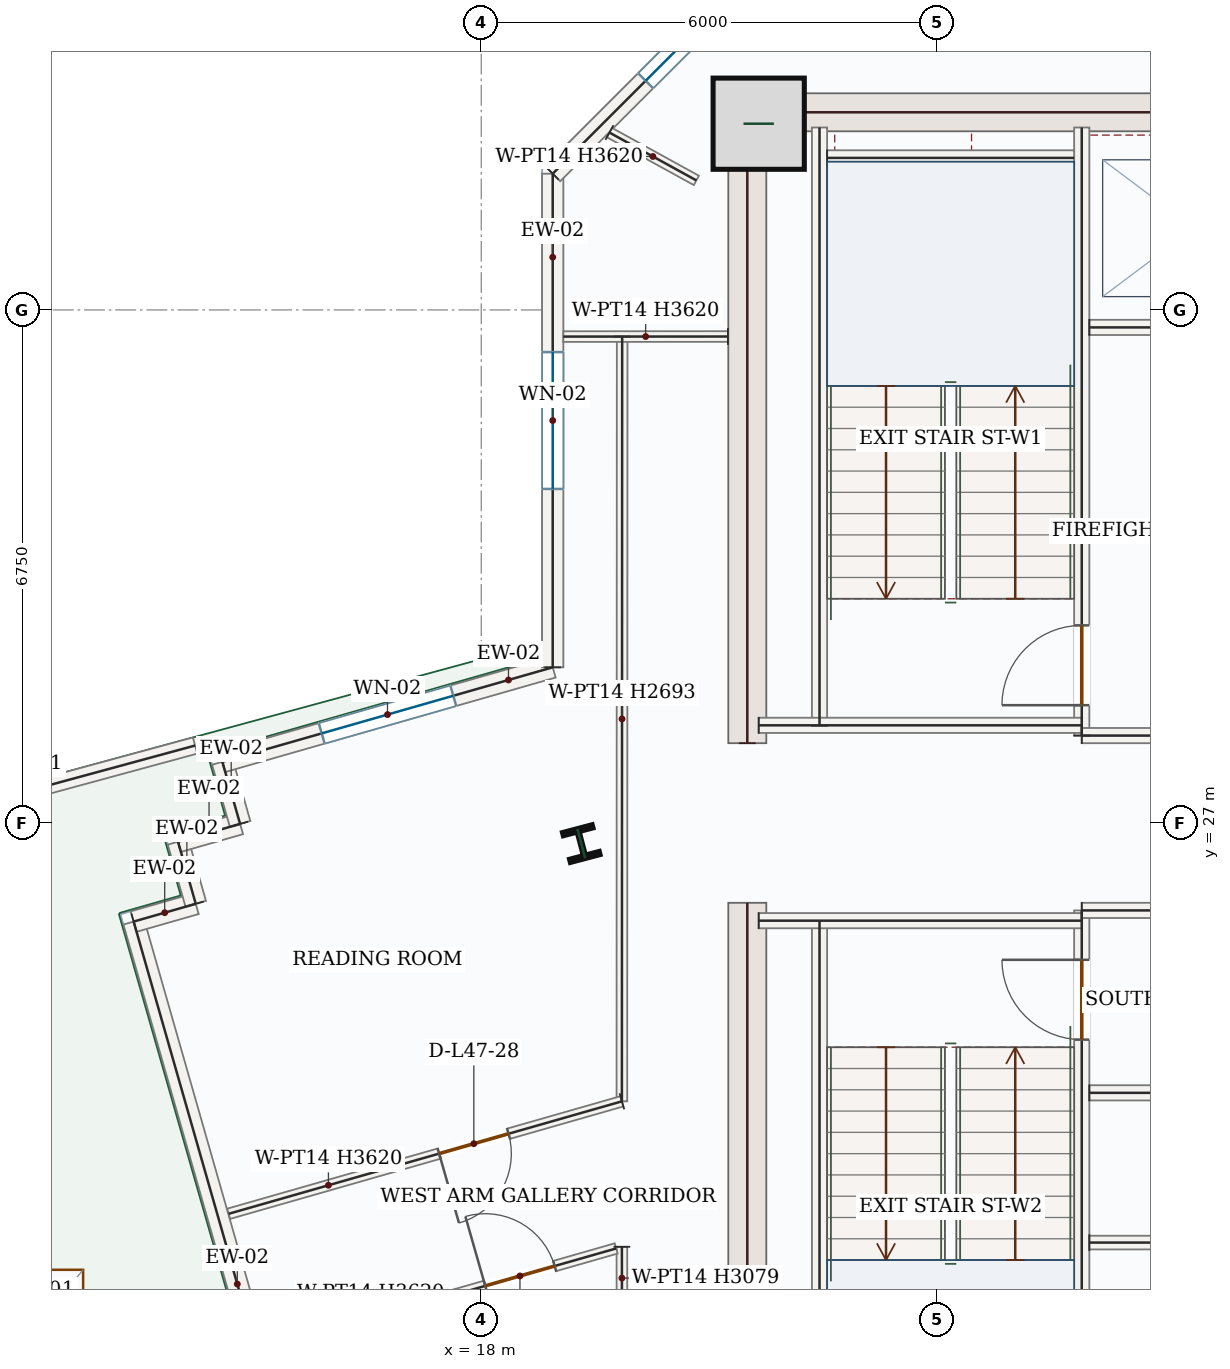
"""IFC4 building model, lengths in metres.
Left out: names, types, materials, properties, quantities, classifications, styles, units other than length and angle.
Written with IfcOpenShell. Run it as: python <this file> out.ifc"""

import sys

from ifc_helpers import new_model, si_unit, direction, frame, frame_2d, origin, origin_2d, place, context, subcontext, project, spatial, rectangle, i_section, extrude, source, transform, mapped, element, fill, save


model = new_model("IFC4")
c1 = context("Model", 3, precision=1e-05, world=origin(), true_north=direction((0.0, 1.0)))
c2 = subcontext(c1, "Body", "Model", "MODEL_VIEW")
j1 = project(units=[si_unit("LENGTHUNIT", "METRE"), si_unit("PLANEANGLEUNIT", "RADIAN")], contexts=[c1])
p1 = place(None, origin())
s1 = spatial("IfcSite", under=j1, at=p1, CompositionType="ELEMENT")
p2 = place(p1, origin())
s2 = spatial("IfcBuilding", under=s1, at=p2, CompositionType="ELEMENT")
p3 = place(p2, frame((0.0, 0.0, 201.9)))
s3 = spatial("IfcBuildingStorey", under=s2, at=p3, CompositionType="ELEMENT", Elevation=201.9)
m1 = source(origin(), c2, "Body", "SweptSolid", [
    extrude(rectangle(XDim=8.55, YDim=0.5, at=frame_2d((4.275, 0.0))), origin(), (0.0, 0.0, 1.0), 3.62),
])
for number, where, z_axis, x_axis in (
    (1, (21.5, 17.4, 0.0), (0.0, 0.0, 1.0), (0.0, 1.0, 0.0)),
    (2, (21.5, 28.05, 0.0), (0.0, 0.0, 1.0), (0.0, 1.0, 0.0)),
):
    element("IfcWall", number, at=place(p3, frame(where, z_axis=z_axis, x_axis=x_axis)), inside=s3, PredefinedType="SHEAR", context=c2, shape_type="MappedRepresentation", body=[
        mapped(m1, transform((0.0, 0.0, 0.0), x_axis=(1.0, 0.0, 0.0), y_axis=(0.0, 1.0, 0.0), z_axis=(0.0, 0.0, 1.0), scale=1.0)),
    ])
m2 = source(origin(), c2, "Body", "SweptSolid", [
    extrude(rectangle(XDim=7.0, YDim=0.5, at=frame_2d((3.5, 0.0))), origin(), (0.0, 0.0, 1.0), 3.62),
])
p4 = place(p3, frame((21.75, 36.35, 0.0), z_axis=(0.0, 0.0, 1.0), x_axis=(1.0, 0.0, 0.0)))
e3 = element("IfcWall", 3, at=p4, inside=s3, PredefinedType="SHEAR", context=c2, shape_type="MappedRepresentation", body=[
    mapped(m2, transform((0.0, 0.0, 0.0), x_axis=(1.0, 0.0, 0.0), y_axis=(0.0, 1.0, 0.0), z_axis=(0.0, 0.0, 1.0), scale=1.0)),
])
m3 = source(origin(), c2, "Body", "SweptSolid", [
    extrude(rectangle(XDim=1.2, YDim=1.2, at=origin_2d()), origin(), (0.0, 0.0, 1.0), 3.9),
])
p5 = place(p3, frame((21.65, 36.2, 0.0), z_axis=(0.0, 0.0, 1.0), x_axis=(1.0, 0.0, 0.0)))
e4 = element("IfcColumn", 4, at=p5, inside=s3, PredefinedType="COLUMN", context=c2, shape_type="MappedRepresentation", body=[
    mapped(m3, transform((0.0, 0.0, 0.0), x_axis=(1.0, 0.0, 0.0), y_axis=(0.0, 1.0, 0.0), z_axis=(0.0, 0.0, 1.0), scale=1.0)),
])
m4 = source(origin(), c2, "Body", "SweptSolid", [
    extrude(i_section(OverallWidth=0.404, OverallDepth=0.407, WebThickness=0.027, FlangeThickness=0.044, FilletRadius=0.018, at=origin_2d()), origin(), (0.0, 0.0, 1.0), 3.9),
])
p6 = place(p3, frame((19.316, 26.729, 0.0), z_axis=(0.0, 0.0, 1.0), x_axis=(0.966823388604, 0.255445757936, 0.0)))
e5 = element("IfcColumn", 5, at=p6, inside=s3, PredefinedType="COLUMN", context=c2, shape_type="MappedRepresentation", body=[
    mapped(m4, transform((0.0, 0.0, 0.0), x_axis=(1.0, 0.0, 0.0), y_axis=(0.0, 1.0, 0.0), z_axis=(0.0, 0.0, 1.0), scale=1.0)),
])
m5 = source(origin(), c2, "Body", "SweptSolid", [
    extrude(rectangle(XDim=4.454, YDim=0.22, at=frame_2d((2.227, 0.0))), origin(), (0.0, 0.0, 1.0), 1.2),
])
p7 = place(p3, frame((9.937, 26.851, 0.0), z_axis=(0.0, 0.0, 1.0), x_axis=(0.965015120543, 0.262194235489, 0.0)))
e6 = element("IfcWall", 6, at=p7, inside=s3, PredefinedType="PARAPET", context=c2, shape_type="MappedRepresentation", body=[
    mapped(m5, transform((0.0, 0.0, 0.0), x_axis=(1.0, 0.0, 0.0), y_axis=(0.0, 1.0, 0.0), z_axis=(0.0, 0.0, 1.0), scale=1.0)),
])
m6 = source(origin(), c2, "Body", "SweptSolid", [
    extrude(rectangle(XDim=9.92, YDim=0.28, at=frame_2d((4.96, 0.0))), origin(), (0.0, 0.0, 1.0), 3.62),
])
p8 = place(p3, frame((16.154, 16.165, 0.0), z_axis=(0.0, 0.0, 1.0), x_axis=(-0.274971401171, 0.961452405758, 0.0)))
e7 = element("IfcWall", 7, at=p8, inside=s3, PredefinedType="SOLIDWALL", context=c2, shape_type="MappedRepresentation", body=[
    mapped(m6, transform((0.0, 0.0, 0.0), x_axis=(1.0, 0.0, 0.0), y_axis=(0.0, 1.0, 0.0), z_axis=(0.0, 0.0, 1.0), scale=1.0)),
])
m7 = source(origin(), c2, "Body", "SweptSolid", [
    extrude(rectangle(XDim=0.85, YDim=0.28, at=frame_2d((0.425, 0.0))), origin(), (0.0, 0.0, 1.0), 3.62),
])
for number, where, z_axis, x_axis in (
    (8, (13.427, 25.703, 0.0), (0.0, 0.0, 1.0), (0.961, 0.275, 0.0)),
    (9, (14.244, 25.937, 0.0), (0.0, 0.0, 1.0), (-0.275, 0.961, 0.0)),
    (10, (14.01, 26.754, 0.0), (0.0, 0.0, 1.0), (0.961, 0.275, 0.0)),
    (11, (14.827, 26.988, 0.0), (0.0, 0.0, 1.0), (-0.275, 0.961, 0.0)),
):
    element("IfcWall", number, at=place(p3, frame(where, z_axis=z_axis, x_axis=x_axis)), inside=s3, PredefinedType="SOLIDWALL", context=c2, shape_type="MappedRepresentation", body=[
        mapped(m7, transform((0.0, 0.0, 0.0), x_axis=(1.0, 0.0, 0.0), y_axis=(0.0, 1.0, 0.0), z_axis=(0.0, 0.0, 1.0), scale=1.0)),
    ])
p9 = place(p3, frame((14.594, 27.805, 0.0), z_axis=(0.0, 0.0, 1.0), x_axis=(0.961446468673, 0.274992159663, 0.0)))
e12 = element("IfcWall", 12, at=p9, inside=s3, PredefinedType="SOLIDWALL", context=c2, shape_type="SweptSolid", body=[
    extrude(rectangle(XDim=4.521, YDim=0.28, at=frame_2d((2.26, 0.0))), origin(), (0.0, 0.0, 1.0), 3.62),
])
p10 = place(p9, frame((1.36, 0.0, 0.85)))
e13 = element("IfcOpeningElement", 13, at=p10, cuts=e12, PredefinedType="OPENING", context=c2, shape_type="SweptSolid", body=[
    extrude(rectangle(XDim=1.8, YDim=1.75, at=frame_2d((0.9, 0.875))), frame((0.0, 0.15, 0.0), z_axis=(0.0, -1.0, 0.0), x_axis=(1.0, 0.0, 0.0)), (0.0, 0.0, 1.0), 0.3),
])
p11 = place(p3, frame((18.94, 29.048, 0.0), z_axis=(0.0, 0.0, 1.0), x_axis=(0.0, 1.0, 0.0)))
e14 = element("IfcWall", 14, at=p11, inside=s3, PredefinedType="SOLIDWALL", context=c2, shape_type="SweptSolid", body=[
    extrude(rectangle(XDim=6.494, YDim=0.28, at=frame_2d((3.247, 0.0))), origin(), (0.0, 0.0, 1.0), 3.62),
])
p12 = place(p11, frame((2.347, 0.0, 0.85)))
e15 = element("IfcOpeningElement", 15, at=p12, cuts=e14, PredefinedType="OPENING", context=c2, shape_type="SweptSolid", body=[
    extrude(rectangle(XDim=1.8, YDim=1.75, at=frame_2d((0.9, 0.875))), frame((0.0, 0.15, 0.0), z_axis=(0.0, -1.0, 0.0), x_axis=(1.0, 0.0, 0.0)), (0.0, 0.0, 1.0), 0.3),
])
p13 = place(p3, frame((18.94, 35.542, 0.0), z_axis=(0.0, 0.0, 1.0), x_axis=(0.707106781187, 0.707106781187, 0.0)))
e16 = element("IfcWall", 16, at=p13, inside=s3, PredefinedType="SOLIDWALL", context=c2, shape_type="SweptSolid", body=[
    extrude(rectangle(XDim=5.258, YDim=0.28, at=frame_2d((2.629, 0.0))), origin(), (0.0, 0.0, 1.0), 3.62),
])
p14 = place(p13, frame((1.729, 0.0, 0.85)))
e17 = element("IfcOpeningElement", 17, at=p14, cuts=e16, PredefinedType="OPENING", context=c2, shape_type="SweptSolid", body=[
    extrude(rectangle(XDim=1.8, YDim=1.75, at=frame_2d((0.9, 0.875))), frame((0.0, 0.15, 0.0), z_axis=(0.0, -1.0, 0.0), x_axis=(1.0, 0.0, 0.0)), (0.0, 0.0, 1.0), 0.3),
])
m8 = source(origin(), c2, "Body", "SweptSolid", [
    extrude(rectangle(XDim=7.87, YDim=0.2, at=frame_2d((3.935, 0.0))), origin(), (0.0, 0.0, 1.0), 3.62),
])
for number, where, z_axis, x_axis in (
    (18, (22.45, 17.85, 0.0), (0.0, 0.0, 1.0), (0.0, 1.0, 0.0)),
    (19, (22.45, 28.28, 0.0), (0.0, 0.0, 1.0), (0.0, 1.0, 0.0)),
):
    element("IfcWall", number, at=place(p3, frame(where, z_axis=z_axis, x_axis=x_axis)), inside=s3, PredefinedType="SOLIDWALL", context=c2, shape_type="MappedRepresentation", body=[
        mapped(m8, transform((0.0, 0.0, 0.0), x_axis=(1.0, 0.0, 0.0), y_axis=(0.0, 1.0, 0.0), z_axis=(0.0, 0.0, 1.0), scale=1.0)),
    ])
p15 = place(p3, frame((25.9, 17.85, 0.0), z_axis=(0.0, 0.0, 1.0), x_axis=(0.0, 1.0, 0.0)))
e20 = element("IfcWall", 20, at=p15, inside=s3, PredefinedType="SOLIDWALL", context=c2, shape_type="SweptSolid", body=[
    extrude(rectangle(XDim=8.0, YDim=0.2, at=frame_2d((4.0, 0.0))), origin(), (0.0, 0.0, 1.0), 3.62),
])
p16 = place(p15, frame((6.3, 0.0, 0.0)))
e21 = element("IfcOpeningElement", 21, at=p16, cuts=e20, PredefinedType="OPENING", context=c2, shape_type="SweptSolid", body=[
    extrude(rectangle(XDim=1.05, YDim=2.15, at=frame_2d((0.525, 1.075))), frame((0.0, 0.11, 0.0), z_axis=(0.0, -1.0, 0.0), x_axis=(1.0, 0.0, 0.0)), (0.0, 0.0, 1.0), 0.22),
])
p17 = place(p3, frame((25.9, 28.15, 0.0), z_axis=(0.0, 0.0, 1.0), x_axis=(0.0, 1.0, 0.0)))
e22 = element("IfcWall", 22, at=p17, inside=s3, PredefinedType="SOLIDWALL", context=c2, shape_type="SweptSolid", body=[
    extrude(rectangle(XDim=8.0, YDim=0.2, at=frame_2d((4.0, 0.0))), origin(), (0.0, 0.0, 1.0), 3.62),
])
p18 = place(p17, frame((0.4, 0.0, 0.0)))
e23 = element("IfcOpeningElement", 23, at=p18, cuts=e22, PredefinedType="OPENING", context=c2, shape_type="SweptSolid", body=[
    extrude(rectangle(XDim=1.05, YDim=2.15, at=frame_2d((0.525, 1.075))), frame((0.0, 0.11, 0.0), z_axis=(0.0, -1.0, 0.0), x_axis=(1.0, 0.0, 0.0)), (0.0, 0.0, 1.0), 0.22),
])
m9 = source(origin(), c2, "Body", "SweptSolid", [
    extrude(rectangle(XDim=4.25, YDim=0.2, at=frame_2d((2.125, 0.0))), origin(), (0.0, 0.0, 1.0), 3.62),
])
p19 = place(p3, frame((21.65, 25.715, 0.0), z_axis=(0.0, 0.0, 1.0), x_axis=(1.0, 0.0, 0.0)))
e24 = element("IfcWall", 24, at=p19, inside=s3, PredefinedType="SOLIDWALL", context=c2, shape_type="MappedRepresentation", body=[
    mapped(m9, transform((0.0, 0.0, 0.0), x_axis=(1.0, 0.0, 0.0), y_axis=(0.0, 1.0, 0.0), z_axis=(0.0, 0.0, 1.0), scale=1.0)),
])
m10 = source(origin(), c2, "Body", "SweptSolid", [
    extrude(rectangle(XDim=3.0, YDim=0.2, at=frame_2d((1.5, 0.0))), origin(), (0.0, 0.0, 1.0), 3.62),
])
p20 = place(p3, frame((25.9, 25.85, 0.0), z_axis=(0.0, 0.0, 1.0), x_axis=(1.0, 0.0, 0.0)))
e25 = element("IfcWall", 25, at=p20, inside=s3, PredefinedType="SOLIDWALL", context=c2, shape_type="MappedRepresentation", body=[
    mapped(m10, transform((0.0, 0.0, 0.0), x_axis=(1.0, 0.0, 0.0), y_axis=(0.0, 1.0, 0.0), z_axis=(0.0, 0.0, 1.0), scale=1.0)),
])
p21 = place(p3, frame((21.65, 28.285, 0.0), z_axis=(0.0, 0.0, 1.0), x_axis=(1.0, 0.0, 0.0)))
e26 = element("IfcWall", 26, at=p21, inside=s3, PredefinedType="SOLIDWALL", context=c2, shape_type="MappedRepresentation", body=[
    mapped(m9, transform((0.0, 0.0, 0.0), x_axis=(1.0, 0.0, 0.0), y_axis=(0.0, 1.0, 0.0), z_axis=(0.0, 0.0, 1.0), scale=1.0)),
])
p22 = place(p3, frame((25.9, 28.15, 0.0), z_axis=(0.0, 0.0, 1.0), x_axis=(1.0, 0.0, 0.0)))
e27 = element("IfcWall", 27, at=p22, inside=s3, PredefinedType="SOLIDWALL", context=c2, shape_type="MappedRepresentation", body=[
    mapped(m10, transform((0.0, 0.0, 0.0), x_axis=(1.0, 0.0, 0.0), y_axis=(0.0, 1.0, 0.0), z_axis=(0.0, 0.0, 1.0), scale=1.0)),
])
m11 = source(origin(), c2, "Body", "SweptSolid", [
    extrude(rectangle(XDim=3.25, YDim=0.2, at=frame_2d((1.625, 0.0))), origin(), (0.0, 0.0, 1.0), 3.62),
])
p23 = place(p3, frame((22.55, 35.75, 0.0), z_axis=(0.0, 0.0, 1.0), x_axis=(1.0, 0.0, 0.0)))
e28 = element("IfcWall", 28, at=p23, inside=s3, PredefinedType="SOLIDWALL", context=c2, shape_type="MappedRepresentation", body=[
    mapped(m11, transform((0.0, 0.0, 0.0), x_axis=(1.0, 0.0, 0.0), y_axis=(0.0, 1.0, 0.0), z_axis=(0.0, 0.0, 1.0), scale=1.0)),
])
p24 = place(p3, frame((26.0, 33.52, 0.0), z_axis=(0.0, 0.0, 1.0), x_axis=(1.0, 0.0, 0.0)))
e29 = element("IfcWall", 29, at=p24, inside=s3, PredefinedType="SOLIDWALL", context=c2, shape_type="SweptSolid", body=[
    extrude(rectangle(XDim=2.75, YDim=0.2, at=frame_2d((1.375, 0.0))), origin(), (0.0, 0.0, 1.0), 3.62),
])
p25 = place(p24, frame((0.82, 0.0, 0.0)))
e30 = element("IfcOpeningElement", 30, at=p25, cuts=e29, PredefinedType="OPENING", context=c2, shape_type="SweptSolid", body=[
    extrude(rectangle(XDim=1.1, YDim=2.15, at=frame_2d((0.55, 1.075))), frame((0.0, 0.11, 0.0), z_axis=(0.0, -1.0, 0.0), x_axis=(1.0, 0.0, 0.0)), (0.0, 0.0, 1.0), 0.22),
])
m12 = source(origin(), c2, "Body", "SweptSolid", [
    extrude(rectangle(XDim=2.75, YDim=0.2, at=frame_2d((1.375, 0.0))), origin(), (0.0, 0.0, 1.0), 3.62),
])
p26 = place(p3, frame((26.0, 23.45, 0.0), z_axis=(0.0, 0.0, 1.0), x_axis=(1.0, 0.0, 0.0)))
e31 = element("IfcWall", 31, at=p26, inside=s3, PredefinedType="SOLIDWALL", context=c2, shape_type="MappedRepresentation", body=[
    mapped(m12, transform((0.0, 0.0, 0.0), x_axis=(1.0, 0.0, 0.0), y_axis=(0.0, 1.0, 0.0), z_axis=(0.0, 0.0, 1.0), scale=1.0)),
])
m13 = source(origin(), c2, "Body", "SweptSolid", [
    extrude(rectangle(XDim=2.75, YDim=0.18, at=frame_2d((1.375, 0.0))), origin(), (0.0, 0.0, 1.0), 3.62),
])
p27 = place(p3, frame((26.0, 21.48, 0.0), z_axis=(0.0, 0.0, 1.0), x_axis=(1.0, 0.0, 0.0)))
e32 = element("IfcWall", 32, at=p27, inside=s3, PredefinedType="PARTITIONING", context=c2, shape_type="MappedRepresentation", body=[
    mapped(m13, transform((0.0, 0.0, 0.0), x_axis=(1.0, 0.0, 0.0), y_axis=(0.0, 1.0, 0.0), z_axis=(0.0, 0.0, 1.0), scale=1.0)),
])
m14 = source(origin(), c2, "Body", "SweptSolid", [
    extrude(rectangle(XDim=10.061, YDim=0.14, at=frame_2d((5.031, 0.0))), origin(), (0.0, 0.0, 1.0), 2.693),
])
p28 = place(p3, frame((19.854, 33.399, 0.0), z_axis=(0.0, 0.0, 1.0), x_axis=(-0.000363980467, -0.999999933759, 0.0)))
e33 = element("IfcWall", 33, at=p28, inside=s3, PredefinedType="PARTITIONING", context=c2, shape_type="MappedRepresentation", body=[
    mapped(m14, transform((0.0, 0.0, 0.0), x_axis=(1.0, 0.0, 0.0), y_axis=(0.0, 1.0, 0.0), z_axis=(0.0, 0.0, 1.0), scale=1.0)),
])
p29 = place(p3, frame((19.85, 23.338, 0.0), z_axis=(0.0, 0.0, 1.0), x_axis=(-0.961455430103, -0.274960826164, 0.0)))
e34 = element("IfcWall", 34, at=p29, inside=s3, PredefinedType="PARTITIONING", context=c2, shape_type="SweptSolid", body=[
    extrude(rectangle(XDim=5.381, YDim=0.14, at=frame_2d((2.69, 0.0))), origin(), (0.0, 0.0, 1.0), 3.62),
])
p30 = place(p29, frame((1.551, 0.0, 0.0)))
e35 = element("IfcOpeningElement", 35, at=p30, cuts=e34, PredefinedType="OPENING", context=c2, shape_type="SweptSolid", body=[
    extrude(rectangle(XDim=0.95, YDim=2.15, at=frame_2d((0.475, 1.075))), frame((0.0, 0.08, 0.0), z_axis=(0.0, -1.0, 0.0), x_axis=(1.0, 0.0, 0.0)), (0.0, 0.0, 1.0), 0.16),
])
m15 = source(origin(), c2, "Body", "SweptSolid", [
    extrude(rectangle(XDim=1.305, YDim=0.14, at=frame_2d((0.653, 0.0))), origin(), (0.0, 0.0, 1.0), 3.62),
])
p31 = place(p3, frame((19.686, 36.083, 0.0), z_axis=(0.0, 0.0, 1.0), x_axis=(0.876117183384, -0.48209820678, 0.0)))
e36 = element("IfcWall", 36, at=p31, inside=s3, PredefinedType="PARTITIONING", context=c2, shape_type="MappedRepresentation", body=[
    mapped(m15, transform((0.0, 0.0, 0.0), x_axis=(1.0, 0.0, 0.0), y_axis=(0.0, 1.0, 0.0), z_axis=(0.0, 0.0, 1.0), scale=1.0)),
])
m16 = source(origin(), c2, "Body", "SweptSolid", [
    extrude(rectangle(XDim=2.165, YDim=0.14, at=frame_2d((1.083, 0.0))), origin(), (0.0, 0.0, 1.0), 3.62),
])
p32 = place(p3, frame((21.245, 33.4, 0.0), z_axis=(0.0, 0.0, 1.0), x_axis=(-0.999999942778, -0.000338294974, 0.0)))
e37 = element("IfcWall", 37, at=p32, inside=s3, PredefinedType="PARTITIONING", context=c2, shape_type="MappedRepresentation", body=[
    mapped(m16, transform((0.0, 0.0, 0.0), x_axis=(1.0, 0.0, 0.0), y_axis=(0.0, 1.0, 0.0), z_axis=(0.0, 0.0, 1.0), scale=1.0)),
])
m17 = source(origin(), c2, "Body", "SweptSolid", [
    extrude(rectangle(XDim=0.823, YDim=0.14, at=frame_2d((0.412, 0.0))), origin(), (0.0, 0.0, 1.0), 3.079),
])
p33 = place(p3, frame((19.85, 21.424, 0.0), z_axis=(0.0, 0.0, 1.0), x_axis=(0.001186238786, -0.999999296419, 0.0)))
e38 = element("IfcWall", 38, at=p33, inside=s3, PredefinedType="PARTITIONING", context=c2, shape_type="MappedRepresentation", body=[
    mapped(m17, transform((0.0, 0.0, 0.0), x_axis=(1.0, 0.0, 0.0), y_axis=(0.0, 1.0, 0.0), z_axis=(0.0, 0.0, 1.0), scale=1.0)),
])
p34 = place(p3, frame((15.183, 20.09, 0.0), z_axis=(0.0, 0.0, 1.0), x_axis=(0.961460270043, 0.274943901784, 0.0)))
e39 = element("IfcWall", 39, at=p34, inside=s3, PredefinedType="PARTITIONING", context=c2, shape_type="SweptSolid", body=[
    extrude(rectangle(XDim=4.776, YDim=0.14, at=frame_2d((2.388, 0.0))), origin(), (0.0, 0.0, 1.0), 3.62),
])
p35 = place(p34, frame((2.985, 0.0, 0.0)))
e40 = element("IfcOpeningElement", 40, at=p35, cuts=e39, PredefinedType="OPENING", context=c2, shape_type="SweptSolid", body=[
    extrude(rectangle(XDim=0.95, YDim=2.15, at=frame_2d((0.475, 1.075))), frame((0.0, 0.08, 0.0), z_axis=(0.0, -1.0, 0.0), x_axis=(1.0, 0.0, 0.0)), (0.0, 0.0, 1.0), 0.16),
])
p36 = place(p3, frame((0.0, 0.0, -0.22)))
p37 = place(p36, frame((12.262, 20.522, 0.0)))
p38 = place(p37, frame((0.0, 0.0, 0.22)))
e41 = element("IfcDoor", 41, at=p38, inside=s3, OperationType="SINGLE_SWING_LEFT", PredefinedType="TRAPDOOR", context=c2, shape_type="SweptSolid", body=[
    extrude(rectangle(XDim=1.0, YDim=1.2, at=origin_2d()), origin(), (0.0, 0.0, 1.0), 0.05),
])
m18 = source(origin(), c2, "Body", "SweptSolid", [
    extrude(rectangle(XDim=1.8, YDim=1.75, at=frame_2d((0.9, 0.875))), frame((0.0, 0.03, 0.0), z_axis=(0.0, -1.0, 0.0), x_axis=(1.0, 0.0, 0.0)), (0.0, 0.0, 1.0), 0.06),
])
p39 = place(p10, origin())
e42 = element("IfcWindow", 42, at=p39, inside=s3, PartitioningType="DOUBLE_PANEL_VERTICAL", PredefinedType="WINDOW", context=c2, shape_type="MappedRepresentation", body=[
    mapped(m18, transform((0.0, 0.0, 0.0), x_axis=(1.0, 0.0, 0.0), y_axis=(0.0, 1.0, 0.0), z_axis=(0.0, 0.0, 1.0), scale=1.0)),
])
fill(e13, e42)
p40 = place(p12, origin())
e43 = element("IfcWindow", 43, at=p40, inside=s3, PartitioningType="DOUBLE_PANEL_VERTICAL", PredefinedType="WINDOW", context=c2, shape_type="MappedRepresentation", body=[
    mapped(m18, transform((0.0, 0.0, 0.0), x_axis=(1.0, 0.0, 0.0), y_axis=(0.0, 1.0, 0.0), z_axis=(0.0, 0.0, 1.0), scale=1.0)),
])
fill(e15, e43)
p41 = place(p14, origin())
e44 = element("IfcWindow", 44, at=p41, inside=s3, PartitioningType="DOUBLE_PANEL_VERTICAL", PredefinedType="WINDOW", context=c2, shape_type="MappedRepresentation", body=[
    mapped(m18, transform((0.0, 0.0, 0.0), x_axis=(1.0, 0.0, 0.0), y_axis=(0.0, 1.0, 0.0), z_axis=(0.0, 0.0, 1.0), scale=1.0)),
])
fill(e17, e44)
m19 = source(origin(), c2, "Body", "SweptSolid", [
    extrude(rectangle(XDim=1.05, YDim=2.15, at=frame_2d((0.525, 1.075))), frame((0.0, 0.025, 0.0), z_axis=(0.0, -1.0, 0.0), x_axis=(1.0, 0.0, 0.0)), (0.0, 0.0, 1.0), 0.05),
])
p42 = place(p18, origin())
e45 = element("IfcDoor", 45, at=p42, inside=s3, OperationType="SINGLE_SWING_LEFT", PredefinedType="DOOR", context=c2, shape_type="MappedRepresentation", body=[
    mapped(m19, transform((0.0, 0.0, 0.0), x_axis=(1.0, 0.0, 0.0), y_axis=(0.0, 1.0, 0.0), z_axis=(0.0, 0.0, 1.0), scale=1.0)),
])
fill(e23, e45)
p43 = place(p16, origin())
e46 = element("IfcDoor", 46, at=p43, inside=s3, OperationType="SINGLE_SWING_RIGHT", PredefinedType="DOOR", context=c2, shape_type="MappedRepresentation", body=[
    mapped(m19, transform((0.0, 0.0, 0.0), x_axis=(1.0, 0.0, 0.0), y_axis=(0.0, 1.0, 0.0), z_axis=(0.0, 0.0, 1.0), scale=1.0)),
])
fill(e21, e46)
m20 = source(origin(), c2, "Body", "SweptSolid", [
    extrude(rectangle(XDim=0.95, YDim=2.15, at=frame_2d((0.475, 1.075))), frame((0.0, 0.025, 0.0), z_axis=(0.0, -1.0, 0.0), x_axis=(1.0, 0.0, 0.0)), (0.0, 0.0, 1.0), 0.05),
])
p44 = place(p30, origin())
e47 = element("IfcDoor", 47, at=p44, inside=s3, OperationType="SINGLE_SWING_RIGHT", PredefinedType="DOOR", context=c2, shape_type="MappedRepresentation", body=[
    mapped(m20, transform((0.0, 0.0, 0.0), x_axis=(1.0, 0.0, 0.0), y_axis=(0.0, 1.0, 0.0), z_axis=(0.0, 0.0, 1.0), scale=1.0)),
])
fill(e35, e47)
p45 = place(p35, origin())
e48 = element("IfcDoor", 48, at=p45, inside=s3, OperationType="SINGLE_SWING_LEFT", PredefinedType="DOOR", context=c2, shape_type="MappedRepresentation", body=[
    mapped(m20, transform((0.0, 0.0, 0.0), x_axis=(1.0, 0.0, 0.0), y_axis=(0.0, 1.0, 0.0), z_axis=(0.0, 0.0, 1.0), scale=1.0)),
])
fill(e40, e48)
save(model, sys.argv[1])
